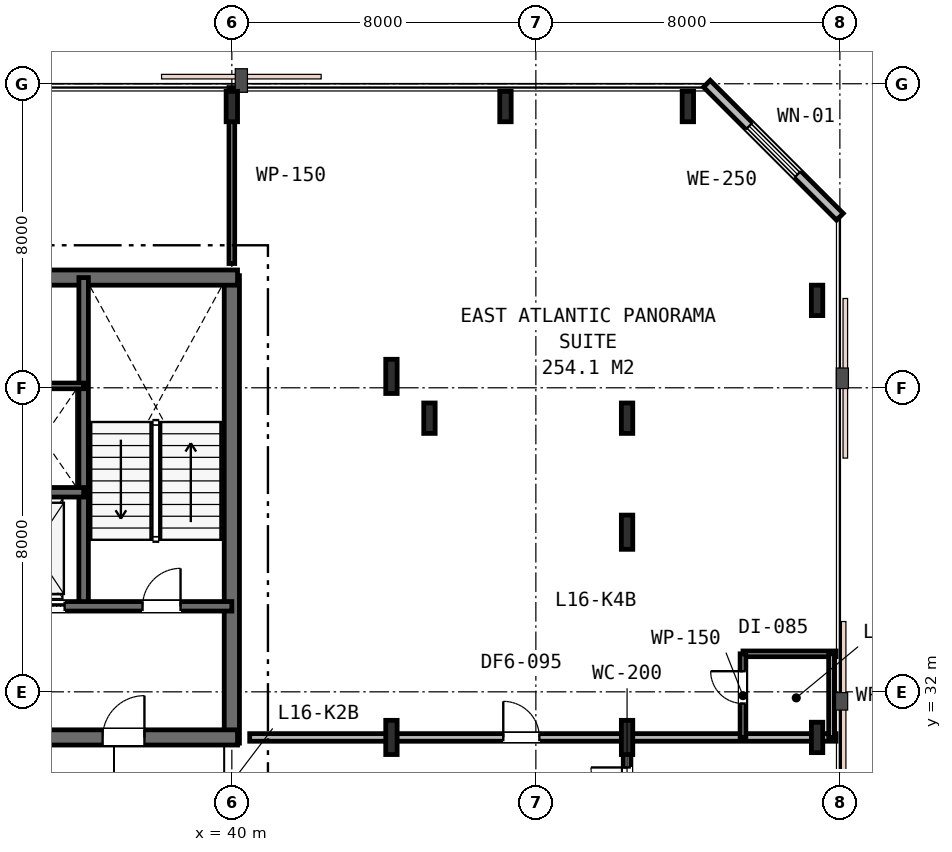
"""IFC4 building model, lengths in metres.
Left out: names, types, materials, properties, quantities, classifications, styles, units other than length and angle.
Written with IfcOpenShell. Run it as: python <this file> out.ifc"""

import sys

from ifc_helpers import new_model, si_unit, direction, frame, frame_2d, origin, origin_2d, place, context, subcontext, project, spatial, rectangle, i_section, extrude, element, fill, save


model = new_model("IFC4")
c1 = context("Model", 3, precision=1e-05, world=origin(), true_north=direction((0.0, 1.0)))
c2 = subcontext(c1, "Body", "Model", "MODEL_VIEW")
j1 = project(units=[si_unit("LENGTHUNIT", "METRE"), si_unit("PLANEANGLEUNIT", "RADIAN")], contexts=[c1])
p1 = place(None, origin())
s1 = spatial("IfcSite", under=j1, at=p1, CompositionType="ELEMENT")
p2 = place(p1, origin())
s2 = spatial("IfcBuilding", under=s1, at=p2, CompositionType="ELEMENT")
p3 = place(p2, frame((0.0, 0.0, 65.4)))
s3 = spatial("IfcBuildingStorey", under=s2, at=p3, CompositionType="ELEMENT", Elevation=65.4)
p4 = place(p3, frame((40.0, 30.65, 0.0), z_axis=(0.0, 0.0, 1.0), x_axis=(0.0, 1.0, 0.0)))
e1 = element("IfcWall", 1, at=p4, inside=s3, PredefinedType="SHEAR", context=c2, shape_type="SweptSolid", body=[
    extrude(rectangle(XDim=12.3, YDim=0.4, at=frame_2d((6.15, 0.0))), origin(), (0.0, 0.0, 1.0), 3.6),
])
p5 = place(p3, frame((15.85, 42.9, 0.0), z_axis=(0.0, 0.0, 1.0), x_axis=(1.0, 0.0, 0.0)))
e2 = element("IfcWall", 2, at=p5, inside=s3, PredefinedType="SHEAR", context=c2, shape_type="SweptSolid", body=[
    extrude(rectangle(XDim=24.3, YDim=0.4, at=frame_2d((12.15, 0.0))), origin(), (0.0, 0.0, 1.0), 3.6),
])
p6 = place(p3, frame((28.95, 30.8, 0.0), z_axis=(0.0, 0.0, 1.0), x_axis=(1.0, 0.0, 0.0)))
e3 = element("IfcWall", 3, at=p6, inside=s3, PredefinedType="SHEAR", context=c2, shape_type="SweptSolid", body=[
    extrude(rectangle(XDim=11.2, YDim=0.4, at=frame_2d((5.6, 0.0))), origin(), (0.0, 0.0, 1.0), 3.6),
])
p7 = place(p6, frame((7.65, 0.0, 0.0)))
e4 = element("IfcOpeningElement", 4, at=p7, cuts=e3, PredefinedType="OPENING", context=c2, shape_type="SweptSolid", body=[
    extrude(rectangle(XDim=1.1, YDim=2.15, at=frame_2d((0.55, 1.075))), frame((0.0, 0.21, 0.0), z_axis=(0.0, -1.0, 0.0), x_axis=(1.0, 0.0, 0.0)), (0.0, 0.0, 1.0), 0.42),
])
p8 = place(p3, frame((36.1, 34.25, 0.0), z_axis=(0.0, 0.0, 1.0), x_axis=(0.0, 1.0, 0.0)))
e5 = element("IfcWall", 5, at=p8, inside=s3, PredefinedType="SHEAR", context=c2, shape_type="SweptSolid", body=[
    extrude(rectangle(XDim=8.65, YDim=0.25, at=frame_2d((4.325, 0.0))), origin(), (0.0, 0.0, 1.0), 3.6),
])
p9 = place(p3, frame((33.95, 34.25, 0.0), z_axis=(0.0, 0.0, 1.0), x_axis=(1.0, 0.0, 0.0)))
e6 = element("IfcWall", 6, at=p9, inside=s3, PredefinedType="SHEAR", context=c2, shape_type="SweptSolid", body=[
    extrude(rectangle(XDim=6.05, YDim=0.25, at=frame_2d((3.025, 0.0))), origin(), (0.0, 0.0, 1.0), 3.6),
])
p10 = place(p9, frame((3.7, 0.0, 0.0)))
e7 = element("IfcOpeningElement", 7, at=p10, cuts=e6, PredefinedType="OPENING", context=c2, shape_type="SweptSolid", body=[
    extrude(rectangle(XDim=1.0, YDim=2.15, at=frame_2d((0.5, 1.075))), frame((0.0, 0.135, 0.0), z_axis=(0.0, -1.0, 0.0), x_axis=(1.0, 0.0, 0.0)), (0.0, 0.0, 1.0), 0.27),
])
p11 = place(p9, frame((0.55, 0.0, 0.0)))
e8 = element("IfcOpeningElement", 8, at=p11, cuts=e6, PredefinedType="OPENING", context=c2, shape_type="SweptSolid", body=[
    extrude(rectangle(XDim=1.1, YDim=2.15, at=frame_2d((0.55, 1.075))), frame((0.0, 0.135, 0.0), z_axis=(0.0, -1.0, 0.0), x_axis=(1.0, 0.0, 0.0)), (0.0, 0.0, 1.0), 0.27),
])
p12 = place(p3, frame((19.9, 37.25, 0.0), z_axis=(0.0, 0.0, 1.0), x_axis=(1.0, 0.0, 0.0)))
e9 = element("IfcWall", 9, at=p12, inside=s3, PredefinedType="SHEAR", context=c2, shape_type="SweptSolid", body=[
    extrude(rectangle(XDim=16.2, YDim=0.25, at=frame_2d((8.1, 0.0))), origin(), (0.0, 0.0, 1.0), 3.6),
])
p13 = place(p12, frame((12.55, 0.0, 0.0)))
e10 = element("IfcOpeningElement", 10, at=p13, cuts=e9, PredefinedType="OPENING", context=c2, shape_type="SweptSolid", body=[
    extrude(rectangle(XDim=0.9, YDim=2.15, at=frame_2d((0.45, 1.075))), frame((0.0, 0.135, 0.0), z_axis=(0.0, -1.0, 0.0), x_axis=(1.0, 0.0, 0.0)), (0.0, 0.0, 1.0), 0.27),
])
for number, where, z_axis, x_axis in (
    (11, (45.2, 39.2, 0.0), (0.0, 0.0, 1.0), (1.0, 0.0, 0.0)),
    (12, (40.0, 47.4, 0.0), (0.0, 0.0, 1.0), (1.0, 0.0, 0.0)),
    (13, (47.2, 47.4, 0.0), (0.0, 0.0, 1.0), (1.0, 0.0, 0.0)),
    (14, (50.4, 39.2, 0.0), (0.0, 0.0, 1.0), (1.0, 0.0, 0.0)),
    (15, (55.4, 30.8, 0.0), (0.0, 0.0, 1.0), (1.0, 0.0, 0.0)),
    (16, (55.4, 42.3, 0.0), (0.0, 0.0, 1.0), (1.0, 0.0, 0.0)),
    (17, (52.0, 47.4, 0.0), (0.0, 0.0, 1.0), (1.0, 0.0, 0.0)),
):
    element("IfcColumn", number, at=place(p3, frame(where, z_axis=z_axis, x_axis=x_axis)), inside=s3, PredefinedType="COLUMN", context=c2, shape_type="SweptSolid", body=[
        extrude(i_section(OverallWidth=0.3, OverallDepth=0.8, WebThickness=0.018, FlangeThickness=0.033, FilletRadius=0.03, at=origin_2d()), origin(), (0.0, 0.0, 1.0), 3.6),
    ])
for number, where, z_axis, x_axis in (
    (18, (44.2, 30.8, 0.0), (0.0, 0.0, 1.0), (1.0, 0.0, 0.0)),
    (19, (44.2, 40.3, 0.0), (0.0, 0.0, 1.0), (1.0, 0.0, 0.0)),
    (20, (50.4, 30.8, 0.0), (0.0, 0.0, 1.0), (1.0, 0.0, 0.0)),
    (21, (50.4, 36.2, 0.0), (0.0, 0.0, 1.0), (1.0, 0.0, 0.0)),
):
    element("IfcColumn", number, at=place(p3, frame(where, z_axis=z_axis, x_axis=x_axis)), inside=s3, PredefinedType="COLUMN", context=c2, shape_type="SweptSolid", body=[
        extrude(i_section(OverallWidth=0.3, OverallDepth=0.9, WebThickness=0.018, FlangeThickness=0.035, FilletRadius=0.03, at=origin_2d()), origin(), (0.0, 0.0, 1.0), 3.6),
    ])
p14 = place(p3, frame((56.0, 44.5, 0.0), z_axis=(0.0, 0.0, 1.0), x_axis=(-0.707106781187, 0.707106781187, 0.0)))
e22 = element("IfcWall", 22, at=p14, inside=s3, PredefinedType="STANDARD", context=c2, shape_type="SweptSolid", body=[
    extrude(rectangle(XDim=4.95, YDim=0.25, at=frame_2d((2.475, 0.0))), origin(), (0.0, 0.0, 1.0), 3.33),
])
p15 = place(p14, frame((1.575, 0.0, 0.75)))
e23 = element("IfcOpeningElement", 23, at=p15, cuts=e22, PredefinedType="OPENING", context=c2, shape_type="SweptSolid", body=[
    extrude(rectangle(XDim=1.8, YDim=1.85, at=frame_2d((0.9, 0.925))), frame((0.0, 0.135, 0.0), z_axis=(0.0, -1.0, 0.0), x_axis=(1.0, 0.0, 0.0)), (0.0, 0.0, 1.0), 0.27),
])
p16 = place(p3, frame((34.05, 40.05, 0.0), z_axis=(0.0, 0.0, 1.0), x_axis=(1.0, 0.0, 0.0)))
e24 = element("IfcWall", 24, at=p16, inside=s3, PredefinedType="PARTITIONING", context=c2, shape_type="SweptSolid", body=[
    extrude(rectangle(XDim=2.05, YDim=0.15, at=frame_2d((1.025, 0.0))), origin(), (0.0, 0.0, 1.0), 3.33),
])
p17 = place(p3, frame((40.0, 43.27, 0.0), z_axis=(0.0, 0.0, 1.0), x_axis=(0.0, 1.0, 0.0)))
e25 = element("IfcWall", 25, at=p17, inside=s3, PredefinedType="PARTITIONING", context=c2, shape_type="SweptSolid", body=[
    extrude(rectangle(XDim=4.63, YDim=0.15, at=frame_2d((2.315, 0.0))), origin(), (0.0, 0.0, 1.0), 2.92),
])
p18 = place(p3, frame((40.47, 30.8, 0.0), z_axis=(0.0, 0.0, 1.0), x_axis=(1.0, 0.0, 0.0)))
e26 = element("IfcWall", 26, at=p18, inside=s3, PredefinedType="PARTITIONING", context=c2, shape_type="SweptSolid", body=[
    extrude(rectangle(XDim=15.43, YDim=0.2, at=frame_2d((7.715, 0.0))), origin(), (0.0, 0.0, 1.0), 2.83),
])
p19 = place(p18, frame((6.673, 0.0, 0.0)))
e27 = element("IfcOpeningElement", 27, at=p19, cuts=e26, PredefinedType="OPENING", context=c2, shape_type="SweptSolid", body=[
    extrude(rectangle(XDim=0.95, YDim=2.15, at=frame_2d((0.475, 1.075))), frame((0.0, 0.11, 0.0), z_axis=(0.0, -1.0, 0.0), x_axis=(1.0, 0.0, 0.0)), (0.0, 0.0, 1.0), 0.22),
])
p20 = place(p3, frame((53.45, 33.0, 0.0), z_axis=(0.0, 0.0, 1.0), x_axis=(1.0, 0.0, 0.0)))
e28 = element("IfcWall", 28, at=p20, inside=s3, PredefinedType="PARTITIONING", context=c2, shape_type="SweptSolid", body=[
    extrude(rectangle(XDim=2.45, YDim=0.15, at=frame_2d((1.225, 0.0))), origin(), (0.0, 0.0, 1.0), 2.92),
])
p21 = place(p3, frame((53.45, 30.8, 0.0), z_axis=(0.0, 0.0, 1.0), x_axis=(0.0, 1.0, 0.0)))
e29 = element("IfcWall", 29, at=p21, inside=s3, PredefinedType="PARTITIONING", context=c2, shape_type="SweptSolid", body=[
    extrude(rectangle(XDim=2.2, YDim=0.15, at=frame_2d((1.1, 0.0))), origin(), (0.0, 0.0, 1.0), 2.83),
])
p22 = place(p21, frame((0.892, 0.0, 0.0)))
e30 = element("IfcOpeningElement", 30, at=p22, cuts=e29, PredefinedType="OPENING", context=c2, shape_type="SweptSolid", body=[
    extrude(rectangle(XDim=0.85, YDim=2.15, at=frame_2d((0.425, 1.075))), frame((0.0, 0.085, 0.0), z_axis=(0.0, -1.0, 0.0), x_axis=(1.0, 0.0, 0.0)), (0.0, 0.0, 1.0), 0.17),
])
p23 = place(p3, frame((55.78, 33.0, 0.0), z_axis=(0.0, 0.0, 1.0), x_axis=(0.0, -1.0, 0.0)))
e31 = element("IfcWall", 31, at=p23, inside=s3, PredefinedType="PARTITIONING", context=c2, shape_type="SweptSolid", body=[
    extrude(rectangle(XDim=2.2, YDim=0.15, at=frame_2d((1.1, 0.0))), origin(), (0.0, 0.0, 1.0), 2.83),
])
p24 = place(p3, frame((50.4, 28.6, 0.0), z_axis=(0.0, 0.0, 1.0), x_axis=(0.0, 1.0, 0.0)))
e32 = element("IfcWall", 32, at=p24, inside=s3, PredefinedType="PARTITIONING", context=c2, shape_type="SweptSolid", body=[
    extrude(rectangle(XDim=2.2, YDim=0.2, at=frame_2d((1.1, 0.0))), origin(), (0.0, 0.0, 1.0), 2.83),
])
p25 = place(p24, frame((0.46, 0.0, 0.0)))
e33 = element("IfcOpeningElement", 33, at=p25, cuts=e32, PredefinedType="OPENING", context=c2, shape_type="SweptSolid", body=[
    extrude(rectangle(XDim=0.95, YDim=2.15, at=frame_2d((0.475, 1.075))), frame((0.0, 0.11, 0.0), z_axis=(0.0, -1.0, 0.0), x_axis=(1.0, 0.0, 0.0)), (0.0, 0.0, 1.0), 0.22),
])
p26 = place(p15, origin())
e34 = element("IfcWindow", 34, at=p26, inside=s3, PartitioningType="SINGLE_PANEL", PredefinedType="WINDOW", context=c2, shape_type="SweptSolid", body=[
    extrude(rectangle(XDim=1.8, YDim=1.85, at=frame_2d((0.9, 0.925))), frame((0.0, 0.03, 0.0), z_axis=(0.0, -1.0, 0.0), x_axis=(1.0, 0.0, 0.0)), (0.0, 0.0, 1.0), 0.06),
])
fill(e23, e34)
p27 = place(p10, origin())
e35 = element("IfcDoor", 35, at=p27, inside=s3, OperationType="SINGLE_SWING_RIGHT", PredefinedType="DOOR", context=c2, shape_type="SweptSolid", body=[
    extrude(rectangle(XDim=1.0, YDim=2.15, at=frame_2d((0.5, 1.075))), frame((0.0, 0.025, 0.0), z_axis=(0.0, -1.0, 0.0), x_axis=(1.0, 0.0, 0.0)), (0.0, 0.0, 1.0), 0.05),
])
fill(e7, e35)
p28 = place(p7, origin())
e36 = element("IfcDoor", 36, at=p28, inside=s3, OperationType="SINGLE_SWING_RIGHT", PredefinedType="DOOR", context=c2, shape_type="SweptSolid", body=[
    extrude(rectangle(XDim=1.1, YDim=2.15, at=frame_2d((0.55, 1.075))), frame((0.0, 0.025, 0.0), z_axis=(0.0, -1.0, 0.0), x_axis=(1.0, 0.0, 0.0)), (0.0, 0.0, 1.0), 0.05),
])
fill(e4, e36)
p29 = place(p19, origin())
e37 = element("IfcDoor", 37, at=p29, inside=s3, OperationType="SINGLE_SWING_LEFT", PredefinedType="DOOR", context=c2, shape_type="SweptSolid", body=[
    extrude(rectangle(XDim=0.95, YDim=2.15, at=frame_2d((0.475, 1.075))), frame((0.0, 0.025, 0.0), z_axis=(0.0, -1.0, 0.0), x_axis=(1.0, 0.0, 0.0)), (0.0, 0.0, 1.0), 0.05),
])
fill(e27, e37)
p30 = place(p22, origin())
e38 = element("IfcDoor", 38, at=p30, inside=s3, OperationType="SINGLE_SWING_RIGHT", PredefinedType="DOOR", context=c2, shape_type="SweptSolid", body=[
    extrude(rectangle(XDim=0.85, YDim=2.15, at=frame_2d((0.425, 1.075))), frame((0.0, 0.025, 0.0), z_axis=(0.0, -1.0, 0.0), x_axis=(1.0, 0.0, 0.0)), (0.0, 0.0, 1.0), 0.05),
])
fill(e30, e38)
p31 = place(p25, origin())
e39 = element("IfcDoor", 39, at=p31, inside=s3, OperationType="SINGLE_SWING_RIGHT", PredefinedType="DOOR", context=c2, shape_type="SweptSolid", body=[
    extrude(rectangle(XDim=0.95, YDim=2.15, at=frame_2d((0.475, 1.075))), frame((0.0, 0.025, 0.0), z_axis=(0.0, -1.0, 0.0), x_axis=(1.0, 0.0, 0.0)), (0.0, 0.0, 1.0), 0.05),
])
fill(e33, e39)
p32 = place(p11, origin())
e40 = element("IfcDoor", 40, at=p32, inside=s3, OperationType="DOUBLE_DOOR_SLIDING", PredefinedType="DOOR", context=c2, shape_type="SweptSolid", body=[
    extrude(rectangle(XDim=1.1, YDim=2.15, at=frame_2d((0.55, 1.075))), frame((0.0, 0.025, 0.0), z_axis=(0.0, -1.0, 0.0), x_axis=(1.0, 0.0, 0.0)), (0.0, 0.0, 1.0), 0.05),
])
fill(e8, e40)
save(model, sys.argv[1])
